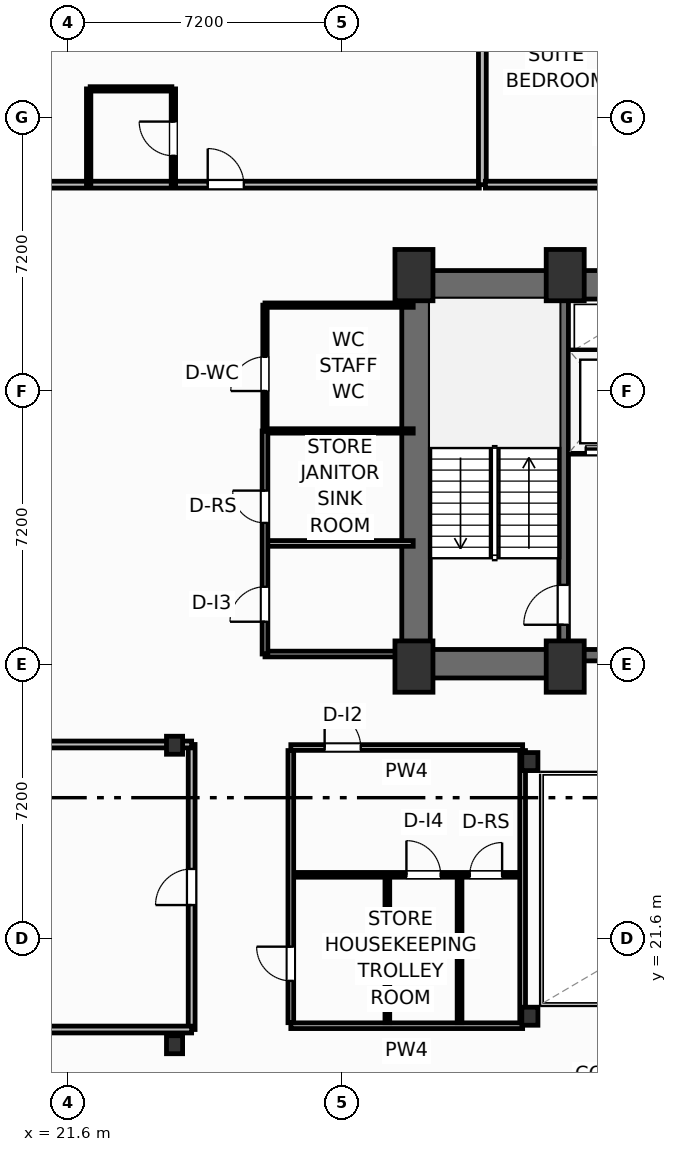
"""IFC4 building model, lengths in metres.
Left out: names, types, materials, properties, quantities, classifications, styles, units other than length and angle.
Written with IfcOpenShell. Run it as: python <this file> out.ifc"""

import sys

from ifc_helpers import new_model, si_unit, direction, frame, frame_2d, origin, origin_2d, place, context, subcontext, project, spatial, rectangle, i_section, extrude, element, fill, save


model = new_model("IFC4")
c1 = context("Model", 3, precision=1e-05, world=origin(), true_north=direction((0.0, 1.0)))
c2 = subcontext(c1, "Body", "Model", "MODEL_VIEW")
j1 = project(units=[si_unit("LENGTHUNIT", "METRE"), si_unit("PLANEANGLEUNIT", "RADIAN")], contexts=[c1])
p1 = place(None, origin())
s1 = spatial("IfcSite", under=j1, at=p1, CompositionType="ELEMENT")
p2 = place(p1, origin())
s2 = spatial("IfcBuilding", under=s1, at=p2, CompositionType="ELEMENT")
p3 = place(p2, frame((0.0, 0.0, 129.1)))
s3 = spatial("IfcBuildingStorey", under=s2, at=p3, CompositionType="ELEMENT", Elevation=129.1)
for number, where, z_axis, x_axis in (
    (1, (30.7, 28.75, 0.0), (0.0, 0.0, 1.0), (1.0, 0.0, 0.0)),
    (2, (34.68, 28.75, 0.0), (0.0, 0.0, 1.0), (1.0, 0.0, 0.0)),
    (3, (30.7, 39.05, 0.0), (0.0, 0.0, 1.0), (1.0, 0.0, 0.0)),
    (4, (34.68, 39.05, 0.0), (0.0, 0.0, 1.0), (1.0, 0.0, 0.0)),
):
    element("IfcColumn", number, at=place(p3, frame(where, z_axis=z_axis, x_axis=x_axis)), inside=s3, PredefinedType="COLUMN", context=c2, shape_type="SweptSolid", body=[
        extrude(rectangle(XDim=1.0, YDim=1.35, at=origin_2d()), origin(), (0.0, 0.0, 1.0), 3.7),
    ])
for number, where, z_axis, x_axis in (
    (5, (33.75, 19.55, 0.0), (0.0, 0.0, 1.0), (1.0, 0.0, 0.0)),
    (6, (33.75, 26.25, 0.0), (0.0, 0.0, 1.0), (1.0, 0.0, 0.0)),
    (7, (24.4, 18.8, 0.0), (0.0, 0.0, 1.0), (1.0, 0.0, 0.0)),
    (8, (24.4, 26.68, 0.0), (0.0, 0.0, 1.0), (1.0, 0.0, 0.0)),
):
    element("IfcColumn", number, at=place(p3, frame(where, z_axis=z_axis, x_axis=x_axis)), inside=s3, PredefinedType="COLUMN", context=c2, shape_type="SweptSolid", body=[
        extrude(i_section(OverallWidth=0.424, OverallDepth=0.474, WebThickness=0.048, FlangeThickness=0.077, FilletRadius=0.025, at=origin_2d()), origin(), (0.0, 0.0, 1.0), 3.7),
    ])
p4 = place(p3, frame((30.38, 38.795, 0.0), z_axis=(0.0, 0.0, 1.0), x_axis=(1.0, 0.0, 0.0)))
e9 = element("IfcWall", 9, at=p4, inside=s3, PredefinedType="SHEAR", context=c2, shape_type="SweptSolid", body=[
    extrude(rectangle(XDim=17.64, YDim=0.75, at=frame_2d((8.82, 0.0))), origin(), (0.0, 0.0, 1.0), 3.45),
])
p5 = place(p3, frame((30.755, 29.2, 0.0), z_axis=(0.0, 0.0, 1.0), x_axis=(0.0, 1.0, 0.0)))
e10 = element("IfcWall", 10, at=p5, inside=s3, PredefinedType="SHEAR", context=c2, shape_type="SweptSolid", body=[
    extrude(rectangle(XDim=9.22, YDim=0.75, at=frame_2d((4.61, 0.0))), origin(), (0.0, 0.0, 1.0), 3.45),
])
p6 = place(p3, frame((30.38, 28.825, 0.0), z_axis=(0.0, 0.0, 1.0), x_axis=(1.0, 0.0, 0.0)))
e11 = element("IfcWall", 11, at=p6, inside=s3, PredefinedType="SHEAR", context=c2, shape_type="SweptSolid", body=[
    extrude(rectangle(XDim=4.42, YDim=0.75, at=frame_2d((2.21, 0.0))), origin(), (0.0, 0.0, 1.0), 3.45),
])
p7 = place(p3, frame((34.8, 29.05, 0.0), z_axis=(0.0, 0.0, 1.0), x_axis=(1.0, 0.0, 0.0)))
e12 = element("IfcWall", 12, at=p7, inside=s3, PredefinedType="SHEAR", context=c2, shape_type="SweptSolid", body=[
    extrude(rectangle(XDim=8.8, YDim=0.3, at=frame_2d((4.4, 0.0))), origin(), (0.0, 0.0, 1.0), 3.45),
])
p8 = place(p7, frame((0.95, 0.0, 0.0)))
e13 = element("IfcOpeningElement", 13, at=p8, cuts=e12, PredefinedType="OPENING", context=c2, shape_type="SweptSolid", body=[
    extrude(rectangle(XDim=1.1, YDim=2.15, at=frame_2d((0.55, 1.075))), frame((0.0, 0.16, 0.0), z_axis=(0.0, -1.0, 0.0), x_axis=(1.0, 0.0, 0.0)), (0.0, 0.0, 1.0), 0.32),
])
p9 = place(p7, frame((6.75, 0.0, 0.0)))
e14 = element("IfcOpeningElement", 14, at=p9, cuts=e12, PredefinedType="OPENING", context=c2, shape_type="SweptSolid", body=[
    extrude(rectangle(XDim=1.1, YDim=2.15, at=frame_2d((0.55, 1.075))), frame((0.0, 0.16, 0.0), z_axis=(0.0, -1.0, 0.0), x_axis=(1.0, 0.0, 0.0)), (0.0, 0.0, 1.0), 0.32),
])
p10 = place(p7, frame((4.45, 0.0, 0.0)))
e15 = element("IfcOpeningElement", 15, at=p10, cuts=e12, PredefinedType="OPENING", context=c2, shape_type="SweptSolid", body=[
    extrude(rectangle(XDim=0.95, YDim=2.15, at=frame_2d((0.475, 1.075))), frame((0.0, 0.16, 0.0), z_axis=(0.0, -1.0, 0.0), x_axis=(1.0, 0.0, 0.0)), (0.0, 0.0, 1.0), 0.32),
])
p11 = place(p3, frame((34.64, 29.2, 0.0), z_axis=(0.0, 0.0, 1.0), x_axis=(0.0, 1.0, 0.0)))
e16 = element("IfcWall", 16, at=p11, inside=s3, PredefinedType="SHEAR", context=c2, shape_type="SweptSolid", body=[
    extrude(rectangle(XDim=9.22, YDim=0.25, at=frame_2d((4.61, 0.0))), origin(), (0.0, 0.0, 1.0), 3.45),
])
p12 = place(p11, frame((0.65, 0.0, 0.0)))
e17 = element("IfcOpeningElement", 17, at=p12, cuts=e16, PredefinedType="OPENING", context=c2, shape_type="SweptSolid", body=[
    extrude(rectangle(XDim=1.05, YDim=2.15, at=frame_2d((0.525, 1.075))), frame((0.0, 0.135, 0.0), z_axis=(0.0, -1.0, 0.0), x_axis=(1.0, 0.0, 0.0)), (0.0, 0.0, 1.0), 0.27),
])
p13 = place(p3, frame((3.864, 41.43, 0.0), z_axis=(0.0, 0.0, 1.0), x_axis=(1.0, 0.0, 0.0)))
e18 = element("IfcWall", 18, at=p13, inside=s3, PredefinedType="PARTITIONING", context=c2, shape_type="SweptSolid", body=[
    extrude(rectangle(XDim=28.556, YDim=0.18, at=frame_2d((14.278, 0.0))), origin(), (0.0, 0.0, 1.0), 3.45),
])
p14 = place(p13, frame((21.409, 0.0, 0.0)))
e19 = element("IfcOpeningElement", 19, at=p14, cuts=e18, PredefinedType="OPENING", context=c2, shape_type="SweptSolid", body=[
    extrude(rectangle(XDim=0.95, YDim=2.15, at=frame_2d((0.475, 1.075))), frame((0.0, 0.1, 0.0), z_axis=(0.0, -1.0, 0.0), x_axis=(1.0, 0.0, 0.0)), (0.0, 0.0, 1.0), 0.2),
])
p15 = place(p3, frame((22.18, 43.95, 0.0), z_axis=(0.0, 0.0, 1.0), x_axis=(1.0, 0.0, 0.0)))
e20 = element("IfcWall", 20, at=p15, inside=s3, PredefinedType="PARTITIONING", context=c2, shape_type="SweptSolid", body=[
    extrude(rectangle(XDim=2.15, YDim=0.115, at=frame_2d((1.075, 0.0))), origin(), (0.0, 0.0, 1.0), 3.45),
])
p16 = place(p3, frame((24.37, 41.43, 0.0), z_axis=(0.0, 0.0, 1.0), x_axis=(0.0, 1.0, 0.0)))
e21 = element("IfcWall", 21, at=p16, inside=s3, PredefinedType="PARTITIONING", context=c2, shape_type="SweptSolid", body=[
    extrude(rectangle(XDim=2.52, YDim=0.115, at=frame_2d((1.26, 0.0))), origin(), (0.0, 0.0, 1.0), 3.45),
])
p17 = place(p16, frame((0.76, 0.0, 0.0)))
e22 = element("IfcOpeningElement", 22, at=p17, cuts=e21, PredefinedType="OPENING", context=c2, shape_type="SweptSolid", body=[
    extrude(rectangle(XDim=0.9, YDim=2.05, at=frame_2d((0.45, 1.025))), frame((0.0, 0.067, 0.0), z_axis=(0.0, -1.0, 0.0), x_axis=(1.0, 0.0, 0.0)), (0.0, 0.0, 1.0), 0.135),
])
p18 = place(p3, frame((22.14, 41.43, 0.0), z_axis=(0.0, 0.0, 1.0), x_axis=(0.0, 1.0, 0.0)))
e23 = element("IfcWall", 23, at=p18, inside=s3, PredefinedType="PARTITIONING", context=c2, shape_type="SweptSolid", body=[
    extrude(rectangle(XDim=2.52, YDim=0.115, at=frame_2d((1.26, 0.0))), origin(), (0.0, 0.0, 1.0), 3.45),
])
p19 = place(p3, frame((32.5, 41.43, 0.0), z_axis=(0.0, 0.0, 1.0), x_axis=(0.0, 1.0, 0.0)))
e24 = element("IfcWall", 24, at=p19, inside=s3, PredefinedType="PARTITIONING", context=c2, shape_type="SweptSolid", body=[
    extrude(rectangle(XDim=5.997, YDim=0.205, at=frame_2d((2.999, 0.0))), origin(), (0.0, 0.0, 1.0), 2.662),
])
p20 = place(p3, frame((32.58, 41.43, 0.0), z_axis=(0.0, 0.0, 1.0), x_axis=(1.0, 0.0, 0.0)))
e25 = element("IfcWall", 25, at=p20, inside=s3, PredefinedType="PARTITIONING", context=c2, shape_type="SweptSolid", body=[
    extrude(rectangle(XDim=9.84, YDim=0.18, at=frame_2d((4.92, 0.0))), origin(), (0.0, 0.0, 1.0), 3.45),
])
p21 = place(p20, frame((5.68, 0.0, 0.0)))
e26 = element("IfcOpeningElement", 26, at=p21, cuts=e25, PredefinedType="OPENING", context=c2, shape_type="SweptSolid", body=[
    extrude(rectangle(XDim=0.95, YDim=2.15, at=frame_2d((0.475, 1.075))), frame((0.0, 0.1, 0.0), z_axis=(0.0, -1.0, 0.0), x_axis=(1.0, 0.0, 0.0)), (0.0, 0.0, 1.0), 0.2),
])
p22 = place(p3, frame((24.85, 19.2, 0.0), z_axis=(0.0, 0.0, 1.0), x_axis=(0.0, 1.0, 0.0)))
e27 = element("IfcWall", 27, at=p22, inside=s3, PredefinedType="PARTITIONING", context=c2, shape_type="SweptSolid", body=[
    extrude(rectangle(XDim=7.5, YDim=0.18, at=frame_2d((3.75, 0.0))), origin(), (0.0, 0.0, 1.0), 3.45),
])
p23 = place(p22, frame((3.275, 0.0, 0.0)))
e28 = element("IfcOpeningElement", 28, at=p23, cuts=e27, PredefinedType="OPENING", context=c2, shape_type="SweptSolid", body=[
    extrude(rectangle(XDim=0.95, YDim=2.05, at=frame_2d((0.475, 1.025))), frame((0.0, 0.1, 0.0), z_axis=(0.0, -1.0, 0.0), x_axis=(1.0, 0.0, 0.0)), (0.0, 0.0, 1.0), 0.2),
])
p24 = place(p3, frame((1.169, 19.2, 0.0), z_axis=(0.0, 0.0, 1.0), x_axis=(1.0, 0.0, 0.0)))
e29 = element("IfcWall", 29, at=p24, inside=s3, PredefinedType="PARTITIONING", context=c2, shape_type="SweptSolid", body=[
    extrude(rectangle(XDim=23.681, YDim=0.18, at=frame_2d((11.84, 0.0))), origin(), (0.0, 0.0, 1.0), 3.45),
])
p25 = place(p3, frame((2.078, 26.7, 0.0), z_axis=(0.0, 0.0, 1.0), x_axis=(1.0, 0.0, 0.0)))
e30 = element("IfcWall", 30, at=p25, inside=s3, PredefinedType="PARTITIONING", context=c2, shape_type="SweptSolid", body=[
    extrude(rectangle(XDim=22.772, YDim=0.18, at=frame_2d((11.386, 0.0))), origin(), (0.0, 0.0, 1.0), 2.662),
])
p26 = place(p3, frame((34.8, 34.44, 0.0), z_axis=(0.0, 0.0, 1.0), x_axis=(1.0, 0.0, 0.0)))
e31 = element("IfcWall", 31, at=p26, inside=s3, PredefinedType="PARTITIONING", context=c2, shape_type="SweptSolid", body=[
    extrude(rectangle(XDim=2.18, YDim=0.2, at=frame_2d((1.09, 0.0))), origin(), (0.0, 0.0, 1.0), 3.45),
])
p27 = place(p26, frame((0.42, 0.0, 0.0)))
e32 = element("IfcOpeningElement", 32, at=p27, cuts=e31, PredefinedType="OPENING", context=c2, shape_type="SweptSolid", body=[
    extrude(rectangle(XDim=1.2, YDim=2.2, at=frame_2d((0.6, 1.1))), frame((0.0, 0.11, 0.0), z_axis=(0.0, -1.0, 0.0), x_axis=(1.0, 0.0, 0.0)), (0.0, 0.0, 1.0), 0.22),
])
p28 = place(p3, frame((34.8, 36.98, 0.0), z_axis=(0.0, 0.0, 1.0), x_axis=(1.0, 0.0, 0.0)))
e33 = element("IfcWall", 33, at=p28, inside=s3, PredefinedType="PARTITIONING", context=c2, shape_type="SweptSolid", body=[
    extrude(rectangle(XDim=2.18, YDim=0.2, at=frame_2d((1.09, 0.0))), origin(), (0.0, 0.0, 1.0), 3.45),
])
p29 = place(p3, frame((27.46, 26.62, 0.0), z_axis=(0.0, 0.0, 1.0), x_axis=(1.0, 0.0, 0.0)))
e34 = element("IfcWall", 34, at=p29, inside=s3, PredefinedType="PARTITIONING", context=c2, shape_type="SweptSolid", body=[
    extrude(rectangle(XDim=6.1, YDim=0.15, at=frame_2d((3.05, 0.0))), origin(), (0.0, 0.0, 1.0), 2.662),
])
p30 = place(p29, frame((0.89, 0.0, 0.0)))
e35 = element("IfcOpeningElement", 35, at=p30, cuts=e34, PredefinedType="OPENING", context=c2, shape_type="SweptSolid", body=[
    extrude(rectangle(XDim=0.95, YDim=2.05, at=frame_2d((0.475, 1.025))), frame((0.0, 0.085, 0.0), z_axis=(0.0, -1.0, 0.0), x_axis=(1.0, 0.0, 0.0)), (0.0, 0.0, 1.0), 0.17),
])
p31 = place(p3, frame((27.46, 19.3, 0.0), z_axis=(0.0, 0.0, 1.0), x_axis=(1.0, 0.0, 0.0)))
e36 = element("IfcWall", 36, at=p31, inside=s3, PredefinedType="PARTITIONING", context=c2, shape_type="SweptSolid", body=[
    extrude(rectangle(XDim=6.1, YDim=0.15, at=frame_2d((3.05, 0.0))), origin(), (0.0, 0.0, 1.0), 2.662),
])
p32 = place(p3, frame((27.52, 23.27, 0.0), z_axis=(0.0, 0.0, 1.0), x_axis=(1.0, 0.0, 0.0)))
e37 = element("IfcWall", 37, at=p32, inside=s3, PredefinedType="PARTITIONING", context=c2, shape_type="SweptSolid", body=[
    extrude(rectangle(XDim=6.0, YDim=0.125, at=frame_2d((3.0, 0.0))), origin(), (0.0, 0.0, 1.0), 3.45),
])
p33 = place(p32, frame((2.982, 0.0, 0.0)))
e38 = element("IfcOpeningElement", 38, at=p33, cuts=e37, PredefinedType="OPENING", context=c2, shape_type="SweptSolid", body=[
    extrude(rectangle(XDim=0.9, YDim=2.05, at=frame_2d((0.45, 1.025))), frame((0.0, 0.073, 0.0), z_axis=(0.0, -1.0, 0.0), x_axis=(1.0, 0.0, 0.0)), (0.0, 0.0, 1.0), 0.145),
])
p34 = place(p32, frame((4.65, 0.0, 0.0)))
e39 = element("IfcOpeningElement", 39, at=p34, cuts=e37, PredefinedType="OPENING", context=c2, shape_type="SweptSolid", body=[
    extrude(rectangle(XDim=0.85, YDim=2.05, at=frame_2d((0.425, 1.025))), frame((0.0, 0.073, 0.0), z_axis=(0.0, -1.0, 0.0), x_axis=(1.0, 0.0, 0.0)), (0.0, 0.0, 1.0), 0.145),
])
for number, where, z_axis, x_axis in (
    (40, (30.0, 19.38, 0.0), (0.0, 0.0, 1.0), (0.0, 1.0, 0.0)),
    (41, (31.9, 19.38, 0.0), (0.0, 0.0, 1.0), (0.0, 1.0, 0.0)),
):
    element("IfcWall", number, at=place(p3, frame(where, z_axis=z_axis, x_axis=x_axis)), inside=s3, PredefinedType="PARTITIONING", context=c2, shape_type="SweptSolid", body=[
        extrude(rectangle(XDim=3.82, YDim=0.125, at=frame_2d((1.91, 0.0))), origin(), (0.0, 0.0, 1.0), 3.45),
    ])
p35 = place(p3, frame((27.46, 19.38, 0.0), z_axis=(0.0, 0.0, 1.0), x_axis=(0.0, 1.0, 0.0)))
e42 = element("IfcWall", 42, at=p35, inside=s3, PredefinedType="PARTITIONING", context=c2, shape_type="SweptSolid", body=[
    extrude(rectangle(XDim=7.16, YDim=0.15, at=frame_2d((3.58, 0.0))), origin(), (0.0, 0.0, 1.0), 3.45),
])
p36 = place(p35, frame((1.1, 0.0, 0.0)))
e43 = element("IfcOpeningElement", 43, at=p36, cuts=e42, PredefinedType="OPENING", context=c2, shape_type="SweptSolid", body=[
    extrude(rectangle(XDim=0.9, YDim=2.05, at=frame_2d((0.45, 1.025))), frame((0.0, 0.085, 0.0), z_axis=(0.0, -1.0, 0.0), x_axis=(1.0, 0.0, 0.0)), (0.0, 0.0, 1.0), 0.17),
])
p37 = place(p3, frame((33.56, 19.38, 0.0), z_axis=(0.0, 0.0, 1.0), x_axis=(0.0, 1.0, 0.0)))
e44 = element("IfcWall", 44, at=p37, inside=s3, PredefinedType="PARTITIONING", context=c2, shape_type="SweptSolid", body=[
    extrude(rectangle(XDim=7.16, YDim=0.15, at=frame_2d((3.58, 0.0))), origin(), (0.0, 0.0, 1.0), 2.824),
])
p38 = place(p3, frame((26.78, 29.08, 0.0), z_axis=(0.0, 0.0, 1.0), x_axis=(1.0, 0.0, 0.0)))
e45 = element("IfcWall", 45, at=p38, inside=s3, PredefinedType="PARTITIONING", context=c2, shape_type="SweptSolid", body=[
    extrude(rectangle(XDim=3.6, YDim=0.15, at=frame_2d((1.8, 0.0))), origin(), (0.0, 0.0, 1.0), 3.45),
])
p39 = place(p3, frame((26.8, 31.99, 0.0), z_axis=(0.0, 0.0, 1.0), x_axis=(1.0, 0.0, 0.0)))
e46 = element("IfcWall", 46, at=p39, inside=s3, PredefinedType="PARTITIONING", context=c2, shape_type="SweptSolid", body=[
    extrude(rectangle(XDim=3.88, YDim=0.15, at=frame_2d((1.94, 0.0))), origin(), (0.0, 0.0, 1.0), 3.45),
])
p40 = place(p3, frame((26.8, 34.95, 0.0), z_axis=(0.0, 0.0, 1.0), x_axis=(1.0, 0.0, 0.0)))
e47 = element("IfcWall", 47, at=p40, inside=s3, PredefinedType="PARTITIONING", context=c2, shape_type="SweptSolid", body=[
    extrude(rectangle(XDim=3.88, YDim=0.115, at=frame_2d((1.94, 0.0))), origin(), (0.0, 0.0, 1.0), 3.45),
])
p41 = place(p3, frame((26.78, 38.26, 0.0), z_axis=(0.0, 0.0, 1.0), x_axis=(1.0, 0.0, 0.0)))
e48 = element("IfcWall", 48, at=p41, inside=s3, PredefinedType="PARTITIONING", context=c2, shape_type="SweptSolid", body=[
    extrude(rectangle(XDim=3.9, YDim=0.115, at=frame_2d((1.95, 0.0))), origin(), (0.0, 0.0, 1.0), 3.45),
])
p42 = place(p3, frame((26.78, 29.08, 0.0), z_axis=(0.0, 0.0, 1.0), x_axis=(0.0, 1.0, 0.0)))
e49 = element("IfcWall", 49, at=p42, inside=s3, PredefinedType="PARTITIONING", context=c2, shape_type="SweptSolid", body=[
    extrude(rectangle(XDim=5.87, YDim=0.15, at=frame_2d((2.935, 0.0))), origin(), (0.0, 0.0, 1.0), 3.45),
])
p43 = place(p42, frame((0.85, 0.0, 0.0)))
e50 = element("IfcOpeningElement", 50, at=p43, cuts=e49, PredefinedType="OPENING", context=c2, shape_type="SweptSolid", body=[
    extrude(rectangle(XDim=0.92, YDim=2.05, at=frame_2d((0.46, 1.025))), frame((0.0, 0.085, 0.0), z_axis=(0.0, -1.0, 0.0), x_axis=(1.0, 0.0, 0.0)), (0.0, 0.0, 1.0), 0.17),
])
p44 = place(p42, frame((3.45, 0.0, 0.0)))
e51 = element("IfcOpeningElement", 51, at=p44, cuts=e49, PredefinedType="OPENING", context=c2, shape_type="SweptSolid", body=[
    extrude(rectangle(XDim=0.85, YDim=2.05, at=frame_2d((0.425, 1.025))), frame((0.0, 0.085, 0.0), z_axis=(0.0, -1.0, 0.0), x_axis=(1.0, 0.0, 0.0)), (0.0, 0.0, 1.0), 0.17),
])
p45 = place(p3, frame((26.78, 34.95, 0.0), z_axis=(0.0, 0.0, 1.0), x_axis=(0.0, 1.0, 0.0)))
e52 = element("IfcWall", 52, at=p45, inside=s3, PredefinedType="PARTITIONING", context=c2, shape_type="SweptSolid", body=[
    extrude(rectangle(XDim=3.31, YDim=0.115, at=frame_2d((1.655, 0.0))), origin(), (0.0, 0.0, 1.0), 3.45),
])
p46 = place(p45, frame((1.05, 0.0, 0.0)))
e53 = element("IfcOpeningElement", 53, at=p46, cuts=e52, PredefinedType="OPENING", context=c2, shape_type="SweptSolid", body=[
    extrude(rectangle(XDim=0.9, YDim=2.05, at=frame_2d((0.45, 1.025))), frame((0.0, 0.067, 0.0), z_axis=(0.0, -1.0, 0.0), x_axis=(1.0, 0.0, 0.0)), (0.0, 0.0, 1.0), 0.135),
])
p47 = place(p14, origin())
e54 = element("IfcDoor", 54, at=p47, inside=s3, OperationType="SINGLE_SWING_LEFT", PredefinedType="DOOR", context=c2, shape_type="SweptSolid", body=[
    extrude(rectangle(XDim=0.95, YDim=2.15, at=frame_2d((0.475, 1.075))), frame((0.0, 0.025, 0.0), z_axis=(0.0, -1.0, 0.0), x_axis=(1.0, 0.0, 0.0)), (0.0, 0.0, 1.0), 0.05),
])
fill(e19, e54)
p48 = place(p17, origin())
e55 = element("IfcDoor", 55, at=p48, inside=s3, OperationType="SINGLE_SWING_RIGHT", PredefinedType="DOOR", context=c2, shape_type="SweptSolid", body=[
    extrude(rectangle(XDim=0.9, YDim=2.05, at=frame_2d((0.45, 1.025))), frame((0.0, 0.025, 0.0), z_axis=(0.0, -1.0, 0.0), x_axis=(1.0, 0.0, 0.0)), (0.0, 0.0, 1.0), 0.05),
])
fill(e22, e55)
p49 = place(p23, origin())
e56 = element("IfcDoor", 56, at=p49, inside=s3, OperationType="SINGLE_SWING_LEFT", PredefinedType="DOOR", context=c2, shape_type="SweptSolid", body=[
    extrude(rectangle(XDim=0.95, YDim=2.05, at=frame_2d((0.475, 1.025))), frame((0.0, 0.025, 0.0), z_axis=(0.0, -1.0, 0.0), x_axis=(1.0, 0.0, 0.0)), (0.0, 0.0, 1.0), 0.05),
])
fill(e28, e56)
p50 = place(p12, origin())
e57 = element("IfcDoor", 57, at=p50, inside=s3, OperationType="SINGLE_SWING_LEFT", PredefinedType="DOOR", context=c2, shape_type="SweptSolid", body=[
    extrude(rectangle(XDim=1.05, YDim=2.15, at=frame_2d((0.525, 1.075))), frame((0.0, 0.025, 0.0), z_axis=(0.0, -1.0, 0.0), x_axis=(1.0, 0.0, 0.0)), (0.0, 0.0, 1.0), 0.05),
])
fill(e17, e57)
p51 = place(p27, origin())
e58 = element("IfcDoor", 58, at=p51, inside=s3, OperationType="SLIDING_TO_LEFT", PredefinedType="DOOR", context=c2, shape_type="SweptSolid", body=[
    extrude(rectangle(XDim=1.2, YDim=2.2, at=frame_2d((0.6, 1.1))), frame((0.0, 0.025, 0.0), z_axis=(0.0, -1.0, 0.0), x_axis=(1.0, 0.0, 0.0)), (0.0, 0.0, 1.0), 0.05),
])
fill(e32, e58)
p52 = place(p30, origin())
e59 = element("IfcDoor", 59, at=p52, inside=s3, OperationType="SINGLE_SWING_LEFT", PredefinedType="DOOR", context=c2, shape_type="SweptSolid", body=[
    extrude(rectangle(XDim=0.95, YDim=2.05, at=frame_2d((0.475, 1.025))), frame((0.0, 0.025, 0.0), z_axis=(0.0, -1.0, 0.0), x_axis=(1.0, 0.0, 0.0)), (0.0, 0.0, 1.0), 0.05),
])
fill(e35, e59)
p53 = place(p33, origin())
e60 = element("IfcDoor", 60, at=p53, inside=s3, OperationType="SINGLE_SWING_LEFT", PredefinedType="DOOR", context=c2, shape_type="SweptSolid", body=[
    extrude(rectangle(XDim=0.9, YDim=2.05, at=frame_2d((0.45, 1.025))), frame((0.0, 0.025, 0.0), z_axis=(0.0, -1.0, 0.0), x_axis=(1.0, 0.0, 0.0)), (0.0, 0.0, 1.0), 0.05),
])
fill(e38, e60)
p54 = place(p34, origin())
e61 = element("IfcDoor", 61, at=p54, inside=s3, OperationType="SINGLE_SWING_RIGHT", PredefinedType="DOOR", context=c2, shape_type="SweptSolid", body=[
    extrude(rectangle(XDim=0.85, YDim=2.05, at=frame_2d((0.425, 1.025))), frame((0.0, 0.025, 0.0), z_axis=(0.0, -1.0, 0.0), x_axis=(1.0, 0.0, 0.0)), (0.0, 0.0, 1.0), 0.05),
])
fill(e39, e61)
p55 = place(p36, origin())
e62 = element("IfcDoor", 62, at=p55, inside=s3, OperationType="SINGLE_SWING_RIGHT", PredefinedType="DOOR", context=c2, shape_type="SweptSolid", body=[
    extrude(rectangle(XDim=0.9, YDim=2.05, at=frame_2d((0.45, 1.025))), frame((0.0, 0.025, 0.0), z_axis=(0.0, -1.0, 0.0), x_axis=(1.0, 0.0, 0.0)), (0.0, 0.0, 1.0), 0.05),
])
fill(e43, e62)
p56 = place(p43, origin())
e63 = element("IfcDoor", 63, at=p56, inside=s3, OperationType="SINGLE_SWING_LEFT", PredefinedType="DOOR", context=c2, shape_type="SweptSolid", body=[
    extrude(rectangle(XDim=0.92, YDim=2.05, at=frame_2d((0.46, 1.025))), frame((0.0, 0.025, 0.0), z_axis=(0.0, -1.0, 0.0), x_axis=(1.0, 0.0, 0.0)), (0.0, 0.0, 1.0), 0.05),
])
fill(e50, e63)
p57 = place(p44, origin())
e64 = element("IfcDoor", 64, at=p57, inside=s3, OperationType="SINGLE_SWING_RIGHT", PredefinedType="DOOR", context=c2, shape_type="SweptSolid", body=[
    extrude(rectangle(XDim=0.85, YDim=2.05, at=frame_2d((0.425, 1.025))), frame((0.0, 0.025, 0.0), z_axis=(0.0, -1.0, 0.0), x_axis=(1.0, 0.0, 0.0)), (0.0, 0.0, 1.0), 0.05),
])
fill(e51, e64)
p58 = place(p46, origin())
e65 = element("IfcDoor", 65, at=p58, inside=s3, OperationType="SINGLE_SWING_LEFT", PredefinedType="DOOR", context=c2, shape_type="SweptSolid", body=[
    extrude(rectangle(XDim=0.9, YDim=2.05, at=frame_2d((0.45, 1.025))), frame((0.0, 0.025, 0.0), z_axis=(0.0, -1.0, 0.0), x_axis=(1.0, 0.0, 0.0)), (0.0, 0.0, 1.0), 0.05),
])
fill(e53, e65)
save(model, sys.argv[1])
